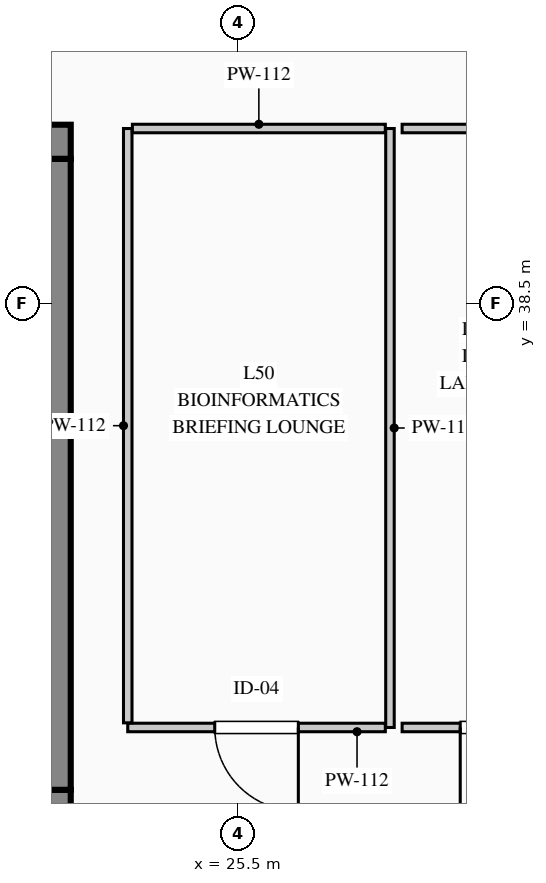
"""IFC4 building model, lengths in metres.
Left out: names, types, materials, properties, quantities, classifications, styles, units other than length and angle.
Written with IfcOpenShell. Run it as: python <this file> out.ifc"""

import sys

from ifc_helpers import new_model, si_unit, direction, frame, frame_2d, origin, place, context, subcontext, project, spatial, rectangle, extrude, element, fill, save


model = new_model("IFC4")
c1 = context("Model", 3, precision=1e-05, world=origin(), true_north=direction((0.0, 1.0)))
c2 = subcontext(c1, "Body", "Model", "MODEL_VIEW")
j1 = project(units=[si_unit("LENGTHUNIT", "METRE"), si_unit("PLANEANGLEUNIT", "RADIAN")], contexts=[c1])
p1 = place(None, origin())
s1 = spatial("IfcSite", under=j1, at=p1, CompositionType="ELEMENT")
p2 = place(p1, origin())
s2 = spatial("IfcBuilding", under=s1, at=p2, CompositionType="ELEMENT")
p3 = place(p2, frame((0.0, 0.0, 211.4)))
s3 = spatial("IfcBuildingStorey", under=s2, at=p3, CompositionType="ELEMENT", Elevation=211.4)
p4 = place(p3, frame((5.55, 40.625, 0.0), z_axis=(0.0, 0.0, 1.0), x_axis=(1.0, 0.0, 0.0)))
e1 = element("IfcWall", 1, at=p4, inside=s3, PredefinedType="SHEAR", context=c2, shape_type="SweptSolid", body=[
    extrude(rectangle(XDim=17.75, YDim=0.45, at=frame_2d((8.875, 0.0))), origin(), (0.0, 0.0, 1.0), 3.95),
])
p5 = place(p4, frame((15.895, 0.0, 0.0)))
e2 = element("IfcOpeningElement", 2, at=p5, cuts=e1, PredefinedType="OPENING", context=c2, shape_type="SweptSolid", body=[
    extrude(rectangle(XDim=1.18, YDim=2.25, at=frame_2d((0.59, 1.125))), frame((0.0, 0.235, 0.0), z_axis=(0.0, -1.0, 0.0), x_axis=(1.0, 0.0, 0.0)), (0.0, 0.0, 1.0), 0.47),
])
p6 = place(p3, frame((5.55, 31.875, 0.0), z_axis=(0.0, 0.0, 1.0), x_axis=(1.0, 0.0, 0.0)))
e3 = element("IfcWall", 3, at=p6, inside=s3, PredefinedType="SHEAR", context=c2, shape_type="SweptSolid", body=[
    extrude(rectangle(XDim=17.75, YDim=0.45, at=frame_2d((8.875, 0.0))), origin(), (0.0, 0.0, 1.0), 3.95),
])
p7 = place(p6, frame((3.1, 0.0, 0.0)))
e4 = element("IfcOpeningElement", 4, at=p7, cuts=e3, PredefinedType="OPENING", context=c2, shape_type="SweptSolid", body=[
    extrude(rectangle(XDim=1.2, YDim=2.2, at=frame_2d((0.6, 1.1))), frame((0.0, 0.235, 0.0), z_axis=(0.0, -1.0, 0.0), x_axis=(1.0, 0.0, 0.0)), (0.0, 0.0, 1.0), 0.47),
])
p8 = place(p6, frame((6.95, 0.0, 0.0)))
e5 = element("IfcOpeningElement", 5, at=p8, cuts=e3, PredefinedType="OPENING", context=c2, shape_type="SweptSolid", body=[
    extrude(rectangle(XDim=1.2, YDim=2.2, at=frame_2d((0.6, 1.1))), frame((0.0, 0.235, 0.0), z_axis=(0.0, -1.0, 0.0), x_axis=(1.0, 0.0, 0.0)), (0.0, 0.0, 1.0), 0.47),
])
p9 = place(p6, frame((8.8, 0.0, 0.0)))
e6 = element("IfcOpeningElement", 6, at=p9, cuts=e3, PredefinedType="OPENING", context=c2, shape_type="SweptSolid", body=[
    extrude(rectangle(XDim=1.15, YDim=2.2, at=frame_2d((0.575, 1.1))), frame((0.0, 0.235, 0.0), z_axis=(0.0, -1.0, 0.0), x_axis=(1.0, 0.0, 0.0)), (0.0, 0.0, 1.0), 0.47),
])
p10 = place(p6, frame((15.9, 0.0, 0.0)))
e7 = element("IfcOpeningElement", 7, at=p10, cuts=e3, PredefinedType="OPENING", context=c2, shape_type="SweptSolid", body=[
    extrude(rectangle(XDim=1.2, YDim=2.2, at=frame_2d((0.6, 1.1))), frame((0.0, 0.235, 0.0), z_axis=(0.0, -1.0, 0.0), x_axis=(1.0, 0.0, 0.0)), (0.0, 0.0, 1.0), 0.47),
])
p11 = place(p3, frame((23.075, 32.1, 0.0), z_axis=(0.0, 0.0, 1.0), x_axis=(0.0, 1.0, 0.0)))
e8 = element("IfcWall", 8, at=p11, inside=s3, PredefinedType="SHEAR", context=c2, shape_type="SweptSolid", body=[
    extrude(rectangle(XDim=8.3, YDim=0.45, at=frame_2d((4.15, 0.0))), origin(), (0.0, 0.0, 1.0), 3.95),
])
p12 = place(p3, frame((27.5, 40.8, 0.0), z_axis=(0.0, 0.0, 1.0), x_axis=(0.0, -1.0, 0.0)))
e9 = element("IfcWall", 9, at=p12, inside=s3, PredefinedType="PARTITIONING", context=c2, shape_type="SweptSolid", body=[
    extrude(rectangle(XDim=7.88, YDim=0.112, at=frame_2d((3.94, 0.0))), origin(), (0.0, 0.0, 1.0), 3.7),
])
p13 = place(p3, frame((27.439, 32.92, 0.0), z_axis=(0.0, 0.0, 1.0), x_axis=(-1.0, 0.0, 0.0)))
e10 = element("IfcWall", 10, at=p13, inside=s3, PredefinedType="PARTITIONING", context=c2, shape_type="SweptSolid", body=[
    extrude(rectangle(XDim=3.389, YDim=0.112, at=frame_2d((1.694, 0.0))), origin(), (0.0, 0.0, 1.0), 3.7),
])
p14 = place(p13, frame((1.145, 0.0, 0.0)))
e11 = element("IfcOpeningElement", 11, at=p14, cuts=e10, PredefinedType="OPENING", context=c2, shape_type="SweptSolid", body=[
    extrude(rectangle(XDim=1.1, YDim=2.2, at=frame_2d((0.55, 1.1))), frame((0.0, 0.066, 0.0), z_axis=(0.0, -1.0, 0.0), x_axis=(1.0, 0.0, 0.0)), (0.0, 0.0, 1.0), 0.132),
])
p15 = place(p3, frame((24.05, 32.981, 0.0), z_axis=(0.0, 0.0, 1.0), x_axis=(0.0, 1.0, 0.0)))
e12 = element("IfcWall", 12, at=p15, inside=s3, PredefinedType="PARTITIONING", context=c2, shape_type="SweptSolid", body=[
    extrude(rectangle(XDim=7.819, YDim=0.112, at=frame_2d((3.91, 0.0))), origin(), (0.0, 0.0, 1.0), 3.7),
])
p16 = place(p3, frame((24.111, 40.8, 0.0), z_axis=(0.0, 0.0, 1.0), x_axis=(1.0, 0.0, 0.0)))
e13 = element("IfcWall", 13, at=p16, inside=s3, PredefinedType="PARTITIONING", context=c2, shape_type="SweptSolid", body=[
    extrude(rectangle(XDim=3.328, YDim=0.112, at=frame_2d((1.664, 0.0))), origin(), (0.0, 0.0, 1.0), 3.7),
])
p17 = place(p3, frame((30.289, 32.92, 0.0), z_axis=(0.0, 0.0, 1.0), x_axis=(-1.0, 0.0, 0.0)))
e14 = element("IfcWall", 14, at=p17, inside=s3, PredefinedType="PARTITIONING", context=c2, shape_type="SweptSolid", body=[
    extrude(rectangle(XDim=2.629, YDim=0.112, at=frame_2d((1.314, 0.0))), origin(), (0.0, 0.0, 1.0), 3.7),
])
p18 = place(p17, frame((0.764, 0.0, 0.0)))
e15 = element("IfcOpeningElement", 15, at=p18, cuts=e14, PredefinedType="OPENING", context=c2, shape_type="SweptSolid", body=[
    extrude(rectangle(XDim=1.1, YDim=2.2, at=frame_2d((0.55, 1.1))), frame((0.0, 0.066, 0.0), z_axis=(0.0, -1.0, 0.0), x_axis=(1.0, 0.0, 0.0)), (0.0, 0.0, 1.0), 0.132),
])
p19 = place(p3, frame((27.66, 40.8, 0.0), z_axis=(0.0, 0.0, 1.0), x_axis=(1.0, 0.0, 0.0)))
e16 = element("IfcWall", 16, at=p19, inside=s3, PredefinedType="PARTITIONING", context=c2, shape_type="SweptSolid", body=[
    extrude(rectangle(XDim=2.629, YDim=0.112, at=frame_2d((1.314, 0.0))), origin(), (0.0, 0.0, 1.0), 3.7),
])
p20 = place(p14, origin())
e17 = element("IfcDoor", 17, at=p20, inside=s3, OperationType="SINGLE_SWING_LEFT", PredefinedType="DOOR", context=c2, shape_type="SweptSolid", body=[
    extrude(rectangle(XDim=1.1, YDim=2.2, at=frame_2d((0.55, 1.1))), frame((0.0, 0.025, 0.0), z_axis=(0.0, -1.0, 0.0), x_axis=(1.0, 0.0, 0.0)), (0.0, 0.0, 1.0), 0.05),
])
fill(e11, e17)
p21 = place(p18, origin())
e18 = element("IfcDoor", 18, at=p21, inside=s3, OperationType="SINGLE_SWING_RIGHT", PredefinedType="DOOR", context=c2, shape_type="SweptSolid", body=[
    extrude(rectangle(XDim=1.1, YDim=2.2, at=frame_2d((0.55, 1.1))), frame((0.0, 0.025, 0.0), z_axis=(0.0, -1.0, 0.0), x_axis=(1.0, 0.0, 0.0)), (0.0, 0.0, 1.0), 0.05),
])
fill(e15, e18)
save(model, sys.argv[1])
